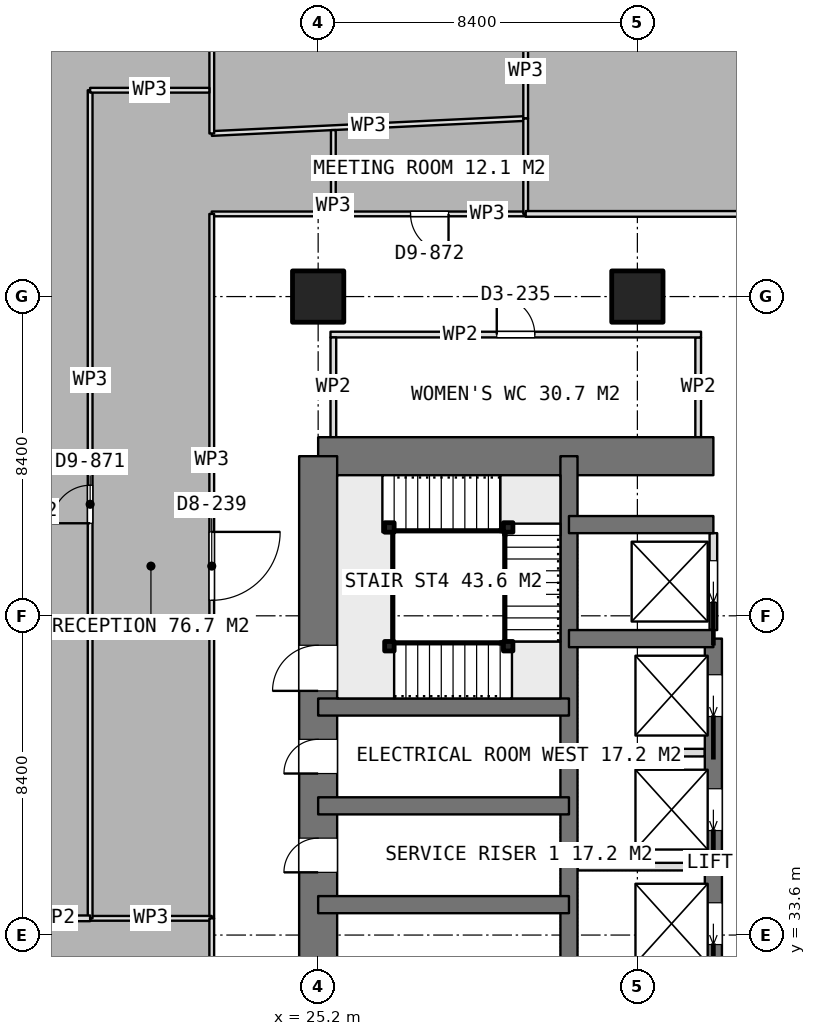
"""IFC4 building model, lengths in metres.
Left out: names, types, materials, properties, quantities, classifications, styles, units other than length and angle.
Written with IfcOpenShell. Run it as: python <this file> out.ifc"""

import sys

from ifc_helpers import new_model, si_unit, direction, frame, frame_2d, origin, origin_2d, place, context, subcontext, project, spatial, rectangle, extrude, element, fill, save


model = new_model("IFC4")
c1 = context("Model", 3, precision=1e-05, world=origin(), true_north=direction((0.0, 1.0)))
c2 = subcontext(c1, "Body", "Model", "MODEL_VIEW")
j1 = project(units=[si_unit("LENGTHUNIT", "METRE"), si_unit("PLANEANGLEUNIT", "RADIAN")], contexts=[c1])
p1 = place(None, origin())
s1 = spatial("IfcSite", under=j1, at=p1, CompositionType="ELEMENT")
p2 = place(p1, origin())
s2 = spatial("IfcBuilding", under=s1, at=p2, CompositionType="ELEMENT")
p3 = place(p2, frame((0.0, 0.0, 217.7)))
s3 = spatial("IfcBuildingStorey", under=s2, at=p3, CompositionType="ELEMENT", Elevation=217.7)
p4 = place(p3, frame((25.2, 46.2, 0.0), z_axis=(0.0, 0.0, 1.0), x_axis=(1.0, 0.0, 0.0)))
e1 = element("IfcWall", 1, at=p4, inside=s3, PredefinedType="SHEAR", context=c2, shape_type="SweptSolid", body=[
    extrude(rectangle(XDim=10.4, YDim=1.0, at=frame_2d((5.2, 0.0))), origin(), (0.0, 0.0, 1.0), 3.75),
])
p5 = place(p3, frame((25.2, 21.0, 0.0), z_axis=(0.0, 0.0, 1.0), x_axis=(0.0, 1.0, 0.0)))
e2 = element("IfcWall", 2, at=p5, inside=s3, PredefinedType="SHEAR", context=c2, shape_type="SweptSolid", body=[
    extrude(rectangle(XDim=25.2, YDim=1.0, at=frame_2d((12.6, 0.0))), origin(), (0.0, 0.0, 1.0), 3.75),
])
p6 = place(p5, frame((7.8, 0.0, 0.0)))
e3 = element("IfcOpeningElement", 3, at=p6, cuts=e2, PredefinedType="OPENING", context=c2, shape_type="SweptSolid", body=[
    extrude(rectangle(XDim=1.2, YDim=2.1, at=frame_2d((0.6, 1.05))), frame((0.0, 0.51, 0.0), z_axis=(0.0, -1.0, 0.0), x_axis=(1.0, 0.0, 0.0)), (0.0, 0.0, 1.0), 1.02),
])
p7 = place(p5, frame((14.25, 0.0, 0.0)))
e4 = element("IfcOpeningElement", 4, at=p7, cuts=e2, PredefinedType="OPENING", context=c2, shape_type="SweptSolid", body=[
    extrude(rectangle(XDim=0.9, YDim=2.1, at=frame_2d((0.45, 1.05))), frame((0.0, 0.51, 0.0), z_axis=(0.0, -1.0, 0.0), x_axis=(1.0, 0.0, 0.0)), (0.0, 0.0, 1.0), 1.02),
])
p8 = place(p5, frame((16.85, 0.0, 0.0)))
e5 = element("IfcOpeningElement", 5, at=p8, cuts=e2, PredefinedType="OPENING", context=c2, shape_type="SweptSolid", body=[
    extrude(rectangle(XDim=0.9, YDim=2.1, at=frame_2d((0.45, 1.05))), frame((0.0, 0.51, 0.0), z_axis=(0.0, -1.0, 0.0), x_axis=(1.0, 0.0, 0.0)), (0.0, 0.0, 1.0), 1.02),
])
p9 = place(p5, frame((19.025, 0.0, 0.0)))
e6 = element("IfcOpeningElement", 6, at=p9, cuts=e2, PredefinedType="OPENING", context=c2, shape_type="SweptSolid", body=[
    extrude(rectangle(XDim=1.2, YDim=2.1, at=frame_2d((0.6, 1.05))), frame((0.0, 0.51, 0.0), z_axis=(0.0, -1.0, 0.0), x_axis=(1.0, 0.0, 0.0)), (0.0, 0.0, 1.0), 1.02),
])
p10 = place(p3, frame((31.8, 21.0, 0.0), z_axis=(0.0, 0.0, 1.0), x_axis=(0.0, 1.0, 0.0)))
e7 = element("IfcWall", 7, at=p10, inside=s3, PredefinedType="SHEAR", context=c2, shape_type="SweptSolid", body=[
    extrude(rectangle(XDim=25.2, YDim=0.45, at=frame_2d((12.6, 0.0))), origin(), (0.0, 0.0, 1.0), 3.75),
])
p11 = place(p3, frame((35.6, 23.4, 0.0), z_axis=(0.0, 0.0, 1.0), x_axis=(0.0, 1.0, 0.0)))
e8 = element("IfcWall", 8, at=p11, inside=s3, PredefinedType="SHEAR", context=c2, shape_type="SweptSolid", body=[
    extrude(rectangle(XDim=18.0, YDim=0.45, at=frame_2d((9.0, 0.0))), origin(), (0.0, 0.0, 1.0), 3.75),
])
p12 = place(p11, frame((0.95, 0.0, 0.0)))
e9 = element("IfcOpeningElement", 9, at=p12, cuts=e8, PredefinedType="OPENING", context=c2, shape_type="SweptSolid", body=[
    extrude(rectangle(XDim=1.1, YDim=2.1, at=frame_2d((0.55, 1.05))), frame((0.0, 0.235, 0.0), z_axis=(0.0, -1.0, 0.0), x_axis=(1.0, 0.0, 0.0)), (0.0, 0.0, 1.0), 0.47),
])
p13 = place(p11, frame((3.95, 0.0, 0.0)))
e10 = element("IfcOpeningElement", 10, at=p13, cuts=e8, PredefinedType="OPENING", context=c2, shape_type="SweptSolid", body=[
    extrude(rectangle(XDim=1.1, YDim=2.1, at=frame_2d((0.55, 1.05))), frame((0.0, 0.235, 0.0), z_axis=(0.0, -1.0, 0.0), x_axis=(1.0, 0.0, 0.0)), (0.0, 0.0, 1.0), 0.47),
])
p14 = place(p11, frame((6.95, 0.0, 0.0)))
e11 = element("IfcOpeningElement", 11, at=p14, cuts=e8, PredefinedType="OPENING", context=c2, shape_type="SweptSolid", body=[
    extrude(rectangle(XDim=1.1, YDim=2.1, at=frame_2d((0.55, 1.05))), frame((0.0, 0.235, 0.0), z_axis=(0.0, -1.0, 0.0), x_axis=(1.0, 0.0, 0.0)), (0.0, 0.0, 1.0), 0.47),
])
p15 = place(p11, frame((9.95, 0.0, 0.0)))
e12 = element("IfcOpeningElement", 12, at=p15, cuts=e8, PredefinedType="OPENING", context=c2, shape_type="SweptSolid", body=[
    extrude(rectangle(XDim=1.1, YDim=2.1, at=frame_2d((0.55, 1.05))), frame((0.0, 0.235, 0.0), z_axis=(0.0, -1.0, 0.0), x_axis=(1.0, 0.0, 0.0)), (0.0, 0.0, 1.0), 0.47),
])
p16 = place(p11, frame((12.95, 0.0, 0.0)))
e13 = element("IfcOpeningElement", 13, at=p16, cuts=e8, PredefinedType="OPENING", context=c2, shape_type="SweptSolid", body=[
    extrude(rectangle(XDim=1.1, YDim=2.1, at=frame_2d((0.55, 1.05))), frame((0.0, 0.235, 0.0), z_axis=(0.0, -1.0, 0.0), x_axis=(1.0, 0.0, 0.0)), (0.0, 0.0, 1.0), 0.47),
])
p17 = place(p11, frame((15.95, 0.0, 0.0)))
e14 = element("IfcOpeningElement", 14, at=p17, cuts=e8, PredefinedType="OPENING", context=c2, shape_type="SweptSolid", body=[
    extrude(rectangle(XDim=1.1, YDim=2.1, at=frame_2d((0.55, 1.05))), frame((0.0, 0.235, 0.0), z_axis=(0.0, -1.0, 0.0), x_axis=(1.0, 0.0, 0.0)), (0.0, 0.0, 1.0), 0.47),
])
for number, where, z_axis, x_axis in (
    (15, (31.8, 41.4, 0.0), (0.0, 0.0, 1.0), (1.0, 0.0, 0.0)),
    (16, (31.8, 44.4, 0.0), (0.0, 0.0, 1.0), (1.0, 0.0, 0.0)),
):
    element("IfcWall", number, at=place(p3, frame(where, z_axis=z_axis, x_axis=x_axis)), inside=s3, PredefinedType="SHEAR", context=c2, shape_type="SweptSolid", body=[
        extrude(rectangle(XDim=3.8, YDim=0.45, at=frame_2d((1.9, 0.0))), origin(), (0.0, 0.0, 1.0), 3.75),
    ])
for number, where, z_axis, x_axis in (
    (17, (25.2, 34.4, 0.0), (0.0, 0.0, 1.0), (1.0, 0.0, 0.0)),
    (18, (25.2, 37.0, 0.0), (0.0, 0.0, 1.0), (1.0, 0.0, 0.0)),
    (19, (25.2, 39.6, 0.0), (0.0, 0.0, 1.0), (1.0, 0.0, 0.0)),
):
    element("IfcWall", number, at=place(p3, frame(where, z_axis=z_axis, x_axis=x_axis)), inside=s3, PredefinedType="SHEAR", context=c2, shape_type="SweptSolid", body=[
        extrude(rectangle(XDim=6.6, YDim=0.45, at=frame_2d((3.3, 0.0))), origin(), (0.0, 0.0, 1.0), 3.75),
    ])
for number, where, z_axis, x_axis in (
    (20, (25.2, 50.4, 0.0), (0.0, 0.0, 1.0), (1.0, 0.0, 0.0)),
    (21, (33.6, 50.4, 0.0), (0.0, 0.0, 1.0), (1.0, 0.0, 0.0)),
):
    element("IfcColumn", number, at=place(p3, frame(where, z_axis=z_axis, x_axis=x_axis)), inside=s3, PredefinedType="COLUMN", context=c2, shape_type="SweptSolid", body=[
        extrude(rectangle(XDim=1.35, YDim=1.35, at=origin_2d()), origin(), (0.0, 0.0, 1.0), 3.75),
    ])
for number, where, z_axis, x_axis in (
    (22, (32.025, 35.4, 0.0), (0.0, 0.0, 1.0), (1.0, 0.0, 0.0)),
    (23, (32.025, 38.4, 0.0), (0.0, 0.0, 1.0), (1.0, 0.0, 0.0)),
):
    element("IfcWall", number, at=place(p3, frame(where, z_axis=z_axis, x_axis=x_axis)), inside=s3, PredefinedType="PARTITIONING", context=c2, shape_type="SweptSolid", body=[
        extrude(rectangle(XDim=3.35, YDim=0.2, at=frame_2d((1.675, 0.0))), origin(), (0.0, 0.0, 1.0), 3.5),
    ])
p18 = place(p3, frame((35.6, 41.625, 0.0), z_axis=(0.0, 0.0, 1.0), x_axis=(0.0, 1.0, 0.0)))
e24 = element("IfcWall", 24, at=p18, inside=s3, PredefinedType="PARTITIONING", context=c2, shape_type="SweptSolid", body=[
    extrude(rectangle(XDim=2.55, YDim=0.2, at=frame_2d((1.275, 0.0))), origin(), (0.0, 0.0, 1.0), 3.5),
])
p19 = place(p18, frame((0.725, 0.0, 0.0)))
e25 = element("IfcOpeningElement", 25, at=p19, cuts=e24, PredefinedType="OPENING", context=c2, shape_type="SweptSolid", body=[
    extrude(rectangle(XDim=1.1, YDim=2.1, at=frame_2d((0.55, 1.05))), frame((0.0, 0.11, 0.0), z_axis=(0.0, -1.0, 0.0), x_axis=(1.0, 0.0, 0.0)), (0.0, 0.0, 1.0), 0.22),
])
p20 = place(p3, frame((25.525, 49.4, 0.0), z_axis=(0.0, 0.0, 1.0), x_axis=(1.0, 0.0, 0.0)))
e26 = element("IfcWall", 26, at=p20, inside=s3, PredefinedType="PARTITIONING", context=c2, shape_type="SweptSolid", body=[
    extrude(rectangle(XDim=9.75, YDim=0.15, at=frame_2d((4.875, 0.0))), origin(), (0.0, 0.0, 1.0), 3.5),
])
p21 = place(p20, frame((4.375, 0.0, 0.0)))
e27 = element("IfcOpeningElement", 27, at=p21, cuts=e26, PredefinedType="OPENING", context=c2, shape_type="SweptSolid", body=[
    extrude(rectangle(XDim=1.0, YDim=2.1, at=frame_2d((0.5, 1.05))), frame((0.0, 0.085, 0.0), z_axis=(0.0, -1.0, 0.0), x_axis=(1.0, 0.0, 0.0)), (0.0, 0.0, 1.0), 0.17),
])
for number, where, z_axis, x_axis in (
    (28, (25.6, 46.7, 0.0), (0.0, 0.0, 1.0), (0.0, 1.0, 0.0)),
    (29, (35.2, 46.7, 0.0), (0.0, 0.0, 1.0), (0.0, 1.0, 0.0)),
):
    element("IfcWall", number, at=place(p3, frame(where, z_axis=z_axis, x_axis=x_axis)), inside=s3, PredefinedType="PARTITIONING", context=c2, shape_type="SweptSolid", body=[
        extrude(rectangle(XDim=2.625, YDim=0.15, at=frame_2d((1.312, 0.0))), origin(), (0.0, 0.0, 1.0), 3.5),
    ])
p22 = place(p3, frame((30.661, 55.086, 0.0), z_axis=(0.0, 0.0, 1.0), x_axis=(-0.998858431805, -0.047768537897, 0.0)))
e30 = element("IfcWall", 30, at=p22, inside=s3, PredefinedType="PARTITIONING", context=c2, shape_type="SweptSolid", body=[
    extrude(rectangle(XDim=8.27, YDim=0.125, at=frame_2d((4.135, 0.0))), origin(), (0.0, 0.0, 1.0), 3.5),
])
p23 = place(p3, frame((22.401, 54.691, 0.0), z_axis=(0.0, 0.0, 1.0), x_axis=(0.0, 1.0, 0.0)))
e31 = element("IfcWall", 31, at=p23, inside=s3, PredefinedType="PARTITIONING", context=c2, shape_type="SweptSolid", body=[
    extrude(rectangle(XDim=6.257, YDim=0.125, at=frame_2d((3.128, 0.0))), origin(), (0.0, 0.0, 1.0), 3.5),
])
p24 = place(p3, frame((30.661, 61.313, 0.0), z_axis=(0.0, 0.0, 1.0), x_axis=(0.0, -1.0, 0.0)))
e32 = element("IfcWall", 32, at=p24, inside=s3, PredefinedType="PARTITIONING", context=c2, shape_type="SweptSolid", body=[
    extrude(rectangle(XDim=6.227, YDim=0.125, at=frame_2d((3.114, 0.0))), origin(), (0.0, 0.0, 1.0), 3.5),
])
p25 = place(p24, frame((2.614, 0.0, 0.0)))
e33 = element("IfcOpeningElement", 33, at=p25, cuts=e32, PredefinedType="OPENING", context=c2, shape_type="SweptSolid", body=[
    extrude(rectangle(XDim=1.0, YDim=2.1, at=frame_2d((0.5, 1.05))), frame((0.0, 0.073, 0.0), z_axis=(0.0, -1.0, 0.0), x_axis=(1.0, 0.0, 0.0)), (0.0, 0.0, 1.0), 0.145),
])
p26 = place(p3, frame((25.6, 54.781, 0.0), z_axis=(0.0, 0.0, 1.0), x_axis=(0.0, -1.0, 0.0)))
e34 = element("IfcWall", 34, at=p26, inside=s3, PredefinedType="PARTITIONING", context=c2, shape_type="SweptSolid", body=[
    extrude(rectangle(XDim=2.206, YDim=0.125, at=frame_2d((1.103, 0.0))), origin(), (0.0, 0.0, 1.0), 3.5),
])
p27 = place(p3, frame((25.6, 52.575, 0.0), z_axis=(0.0, 0.0, 1.0), x_axis=(-1.0, 0.0, 0.0)))
e35 = element("IfcWall", 35, at=p27, inside=s3, PredefinedType="PARTITIONING", context=c2, shape_type="SweptSolid", body=[
    extrude(rectangle(XDim=3.2, YDim=0.125, at=frame_2d((1.6, 0.0))), origin(), (0.0, 0.0, 1.0), 3.5),
])
p28 = place(p3, frame((22.4, 52.575, 0.0), z_axis=(0.0, 0.0, 1.0), x_axis=(0.0, -1.0, 0.0)))
e36 = element("IfcWall", 36, at=p28, inside=s3, PredefinedType="PARTITIONING", context=c2, shape_type="SweptSolid", body=[
    extrude(rectangle(XDim=18.535, YDim=0.125, at=frame_2d((9.268, 0.0))), origin(), (0.0, 0.0, 1.0), 3.5),
])
p29 = place(p28, frame((8.367, 0.0, 0.0)))
e37 = element("IfcOpeningElement", 37, at=p29, cuts=e36, PredefinedType="OPENING", context=c2, shape_type="SweptSolid", body=[
    extrude(rectangle(XDim=1.8, YDim=2.1, at=frame_2d((0.9, 1.05))), frame((0.0, 0.073, 0.0), z_axis=(0.0, -1.0, 0.0), x_axis=(1.0, 0.0, 0.0)), (0.0, 0.0, 1.0), 0.145),
])
p30 = place(p3, frame((22.4, 34.04, 0.0), z_axis=(0.0, 0.0, 1.0), x_axis=(-1.0, 0.0, 0.0)))
e38 = element("IfcWall", 38, at=p30, inside=s3, PredefinedType="PARTITIONING", context=c2, shape_type="SweptSolid", body=[
    extrude(rectangle(XDim=3.2, YDim=0.125, at=frame_2d((1.6, 0.0))), origin(), (0.0, 0.0, 1.0), 3.5),
])
p31 = place(p3, frame((19.2, 34.04, 0.0), z_axis=(0.0, 0.0, 1.0), x_axis=(0.0, 1.0, 0.0)))
e39 = element("IfcWall", 39, at=p31, inside=s3, PredefinedType="PARTITIONING", context=c2, shape_type="SweptSolid", body=[
    extrude(rectangle(XDim=21.789, YDim=0.125, at=frame_2d((10.895, 0.0))), origin(), (0.0, 0.0, 1.0), 3.5),
])
p32 = place(p31, frame((10.395, 0.0, 0.0)))
e40 = element("IfcOpeningElement", 40, at=p32, cuts=e39, PredefinedType="OPENING", context=c2, shape_type="SweptSolid", body=[
    extrude(rectangle(XDim=1.0, YDim=2.1, at=frame_2d((0.5, 1.05))), frame((0.0, 0.073, 0.0), z_axis=(0.0, -1.0, 0.0), x_axis=(1.0, 0.0, 0.0)), (0.0, 0.0, 1.0), 0.145),
])
p33 = place(p3, frame((19.2, 55.829, 0.0), z_axis=(0.0, 0.0, 1.0), x_axis=(1.0, 0.0, 0.0)))
e41 = element("IfcWall", 41, at=p33, inside=s3, PredefinedType="PARTITIONING", context=c2, shape_type="SweptSolid", body=[
    extrude(rectangle(XDim=3.138, YDim=0.125, at=frame_2d((1.569, 0.0))), origin(), (0.0, 0.0, 1.0), 3.5),
])
p34 = place(p3, frame((30.661, 52.575, 0.0), z_axis=(0.0, 0.0, 1.0), x_axis=(-1.0, 0.0, 0.0)))
e42 = element("IfcWall", 42, at=p34, inside=s3, PredefinedType="PARTITIONING", context=c2, shape_type="SweptSolid", body=[
    extrude(rectangle(XDim=5.061, YDim=0.125, at=frame_2d((2.53, 0.0))), origin(), (0.0, 0.0, 1.0), 3.5),
])
p35 = place(p34, frame((2.03, 0.0, 0.0)))
e43 = element("IfcOpeningElement", 43, at=p35, cuts=e42, PredefinedType="OPENING", context=c2, shape_type="SweptSolid", body=[
    extrude(rectangle(XDim=1.0, YDim=2.1, at=frame_2d((0.5, 1.05))), frame((0.0, 0.073, 0.0), z_axis=(0.0, -1.0, 0.0), x_axis=(1.0, 0.0, 0.0)), (0.0, 0.0, 1.0), 0.145),
])
p36 = place(p3, frame((30.661, 55.086, 0.0), z_axis=(0.0, 0.0, 1.0), x_axis=(0.0, -1.0, 0.0)))
e44 = element("IfcWall", 44, at=p36, inside=s3, PredefinedType="PARTITIONING", context=c2, shape_type="SweptSolid", body=[
    extrude(rectangle(XDim=2.511, YDim=0.125, at=frame_2d((1.255, 0.0))), origin(), (0.0, 0.0, 1.0), 3.5),
])
p37 = place(p3, frame((53.2, 52.575, 0.0), z_axis=(0.0, 0.0, 1.0), x_axis=(-1.0, 0.0, 0.0)))
e45 = element("IfcWall", 45, at=p37, inside=s3, PredefinedType="PARTITIONING", context=c2, shape_type="SweptSolid", body=[
    extrude(rectangle(XDim=22.539, YDim=0.15, at=frame_2d((11.27, 0.0))), origin(), (0.0, 0.0, 1.0), 3.5),
])
p38 = place(p3, frame((19.2, 34.04, 0.0), z_axis=(0.0, 0.0, 1.0), x_axis=(-1.0, 0.0, 0.0)))
e46 = element("IfcWall", 46, at=p38, inside=s3, PredefinedType="PARTITIONING", context=c2, shape_type="SweptSolid", body=[
    extrude(rectangle(XDim=1.705, YDim=0.15, at=frame_2d((0.853, 0.0))), origin(), (0.0, 0.0, 1.0), 3.5),
])
p39 = place(p3, frame((22.4, 34.04, 0.0), z_axis=(0.0, 0.0, 1.0), x_axis=(0.0, -1.0, 0.0)))
e47 = element("IfcWall", 47, at=p39, inside=s3, PredefinedType="PARTITIONING", context=c2, shape_type="SweptSolid", body=[
    extrude(rectangle(XDim=5.965, YDim=0.125, at=frame_2d((2.982, 0.0))), origin(), (0.0, 0.0, 1.0), 3.5),
])
p40 = place(p39, frame((2.12, 0.0, 0.0)))
e48 = element("IfcOpeningElement", 48, at=p40, cuts=e47, PredefinedType="OPENING", context=c2, shape_type="SweptSolid", body=[
    extrude(rectangle(XDim=1.8, YDim=2.1, at=frame_2d((0.9, 1.05))), frame((0.0, 0.073, 0.0), z_axis=(0.0, -1.0, 0.0), x_axis=(1.0, 0.0, 0.0)), (0.0, 0.0, 1.0), 0.145),
])
for number, where, z_axis, x_axis in (
    (49, (27.075, 41.2, 0.0), (0.0, 0.0, 1.0), (1.0, 0.0, 0.0)),
    (50, (30.2, 41.2, 0.0), (0.0, 0.0, 1.0), (1.0, 0.0, 0.0)),
    (51, (30.2, 44.325, 0.0), (0.0, 0.0, 1.0), (1.0, 0.0, 0.0)),
    (52, (27.075, 44.325, 0.0), (0.0, 0.0, 1.0), (1.0, 0.0, 0.0)),
):
    element("IfcColumn", number, at=place(p3, frame(where, z_axis=z_axis, x_axis=x_axis)), inside=s3, PredefinedType="COLUMN", context=c2, shape_type="SweptSolid", body=[
        extrude(rectangle(XDim=0.25, YDim=0.25, at=origin_2d()), origin(), (0.0, 0.0, 1.0), 3.75),
    ])
p41 = place(p7, origin())
e53 = element("IfcDoor", 53, at=p41, inside=s3, OperationType="SINGLE_SWING_LEFT", PredefinedType="DOOR", context=c2, shape_type="SweptSolid", body=[
    extrude(rectangle(XDim=0.9, YDim=2.1, at=frame_2d((0.45, 1.05))), frame((0.0, 0.025, 0.0), z_axis=(0.0, -1.0, 0.0), x_axis=(1.0, 0.0, 0.0)), (0.0, 0.0, 1.0), 0.05),
])
fill(e4, e53)
p42 = place(p8, origin())
e54 = element("IfcDoor", 54, at=p42, inside=s3, OperationType="SINGLE_SWING_LEFT", PredefinedType="DOOR", context=c2, shape_type="SweptSolid", body=[
    extrude(rectangle(XDim=0.9, YDim=2.1, at=frame_2d((0.45, 1.05))), frame((0.0, 0.025, 0.0), z_axis=(0.0, -1.0, 0.0), x_axis=(1.0, 0.0, 0.0)), (0.0, 0.0, 1.0), 0.05),
])
fill(e5, e54)
p43 = place(p15, origin())
e55 = element("IfcDoor", 55, at=p43, inside=s3, OperationType="SLIDING_TO_LEFT", PredefinedType="USERDEFINED", context=c2, shape_type="SweptSolid", body=[
    extrude(rectangle(XDim=1.1, YDim=2.1, at=frame_2d((0.55, 1.05))), frame((0.0, 0.025, 0.0), z_axis=(0.0, -1.0, 0.0), x_axis=(1.0, 0.0, 0.0)), (0.0, 0.0, 1.0), 0.05),
])
fill(e12, e55)
p44 = place(p16, origin())
e56 = element("IfcDoor", 56, at=p44, inside=s3, OperationType="SLIDING_TO_LEFT", PredefinedType="USERDEFINED", context=c2, shape_type="SweptSolid", body=[
    extrude(rectangle(XDim=1.1, YDim=2.1, at=frame_2d((0.55, 1.05))), frame((0.0, 0.025, 0.0), z_axis=(0.0, -1.0, 0.0), x_axis=(1.0, 0.0, 0.0)), (0.0, 0.0, 1.0), 0.05),
])
fill(e13, e56)
p45 = place(p17, origin())
e57 = element("IfcDoor", 57, at=p45, inside=s3, OperationType="SLIDING_TO_LEFT", PredefinedType="USERDEFINED", context=c2, shape_type="SweptSolid", body=[
    extrude(rectangle(XDim=1.1, YDim=2.1, at=frame_2d((0.55, 1.05))), frame((0.0, 0.025, 0.0), z_axis=(0.0, -1.0, 0.0), x_axis=(1.0, 0.0, 0.0)), (0.0, 0.0, 1.0), 0.05),
])
fill(e14, e57)
p46 = place(p19, origin())
e58 = element("IfcDoor", 58, at=p46, inside=s3, OperationType="SLIDING_TO_LEFT", PredefinedType="USERDEFINED", context=c2, shape_type="SweptSolid", body=[
    extrude(rectangle(XDim=1.1, YDim=2.1, at=frame_2d((0.55, 1.05))), frame((0.0, 0.025, 0.0), z_axis=(0.0, -1.0, 0.0), x_axis=(1.0, 0.0, 0.0)), (0.0, 0.0, 1.0), 0.05),
])
fill(e25, e58)
p47 = place(p21, origin())
e59 = element("IfcDoor", 59, at=p47, inside=s3, OperationType="SINGLE_SWING_LEFT", PredefinedType="DOOR", context=c2, shape_type="SweptSolid", body=[
    extrude(rectangle(XDim=1.0, YDim=2.1, at=frame_2d((0.5, 1.05))), frame((0.0, 0.025, 0.0), z_axis=(0.0, -1.0, 0.0), x_axis=(1.0, 0.0, 0.0)), (0.0, 0.0, 1.0), 0.05),
])
fill(e27, e59)
p48 = place(p29, origin())
e60 = element("IfcDoor", 60, at=p48, inside=s3, OperationType="DOUBLE_DOOR_SINGLE_SWING", PredefinedType="DOOR", context=c2, shape_type="SweptSolid", body=[
    extrude(rectangle(XDim=1.8, YDim=2.1, at=frame_2d((0.9, 1.05))), frame((0.0, 0.025, 0.0), z_axis=(0.0, -1.0, 0.0), x_axis=(1.0, 0.0, 0.0)), (0.0, 0.0, 1.0), 0.05),
])
fill(e37, e60)
p49 = place(p35, origin())
e61 = element("IfcDoor", 61, at=p49, inside=s3, OperationType="SINGLE_SWING_LEFT", PredefinedType="DOOR", context=c2, shape_type="SweptSolid", body=[
    extrude(rectangle(XDim=1.0, YDim=2.1, at=frame_2d((0.5, 1.05))), frame((0.0, 0.025, 0.0), z_axis=(0.0, -1.0, 0.0), x_axis=(1.0, 0.0, 0.0)), (0.0, 0.0, 1.0), 0.05),
])
fill(e43, e61)
p50 = place(p32, origin())
e62 = element("IfcDoor", 62, at=p50, inside=s3, OperationType="SINGLE_SWING_LEFT", PredefinedType="DOOR", context=c2, shape_type="SweptSolid", body=[
    extrude(rectangle(XDim=1.0, YDim=2.1, at=frame_2d((0.5, 1.05))), frame((0.0, 0.025, 0.0), z_axis=(0.0, -1.0, 0.0), x_axis=(1.0, 0.0, 0.0)), (0.0, 0.0, 1.0), 0.05),
])
fill(e40, e62)
p51 = place(p9, origin())
e63 = element("IfcDoor", 63, at=p51, inside=s3, OperationType="SINGLE_SWING_RIGHT", PredefinedType="DOOR", context=c2, shape_type="SweptSolid", body=[
    extrude(rectangle(XDim=1.2, YDim=2.1, at=frame_2d((0.6, 1.05))), frame((0.0, 0.025, 0.0), z_axis=(0.0, -1.0, 0.0), x_axis=(1.0, 0.0, 0.0)), (0.0, 0.0, 1.0), 0.05),
])
fill(e6, e63)
save(model, sys.argv[1])
